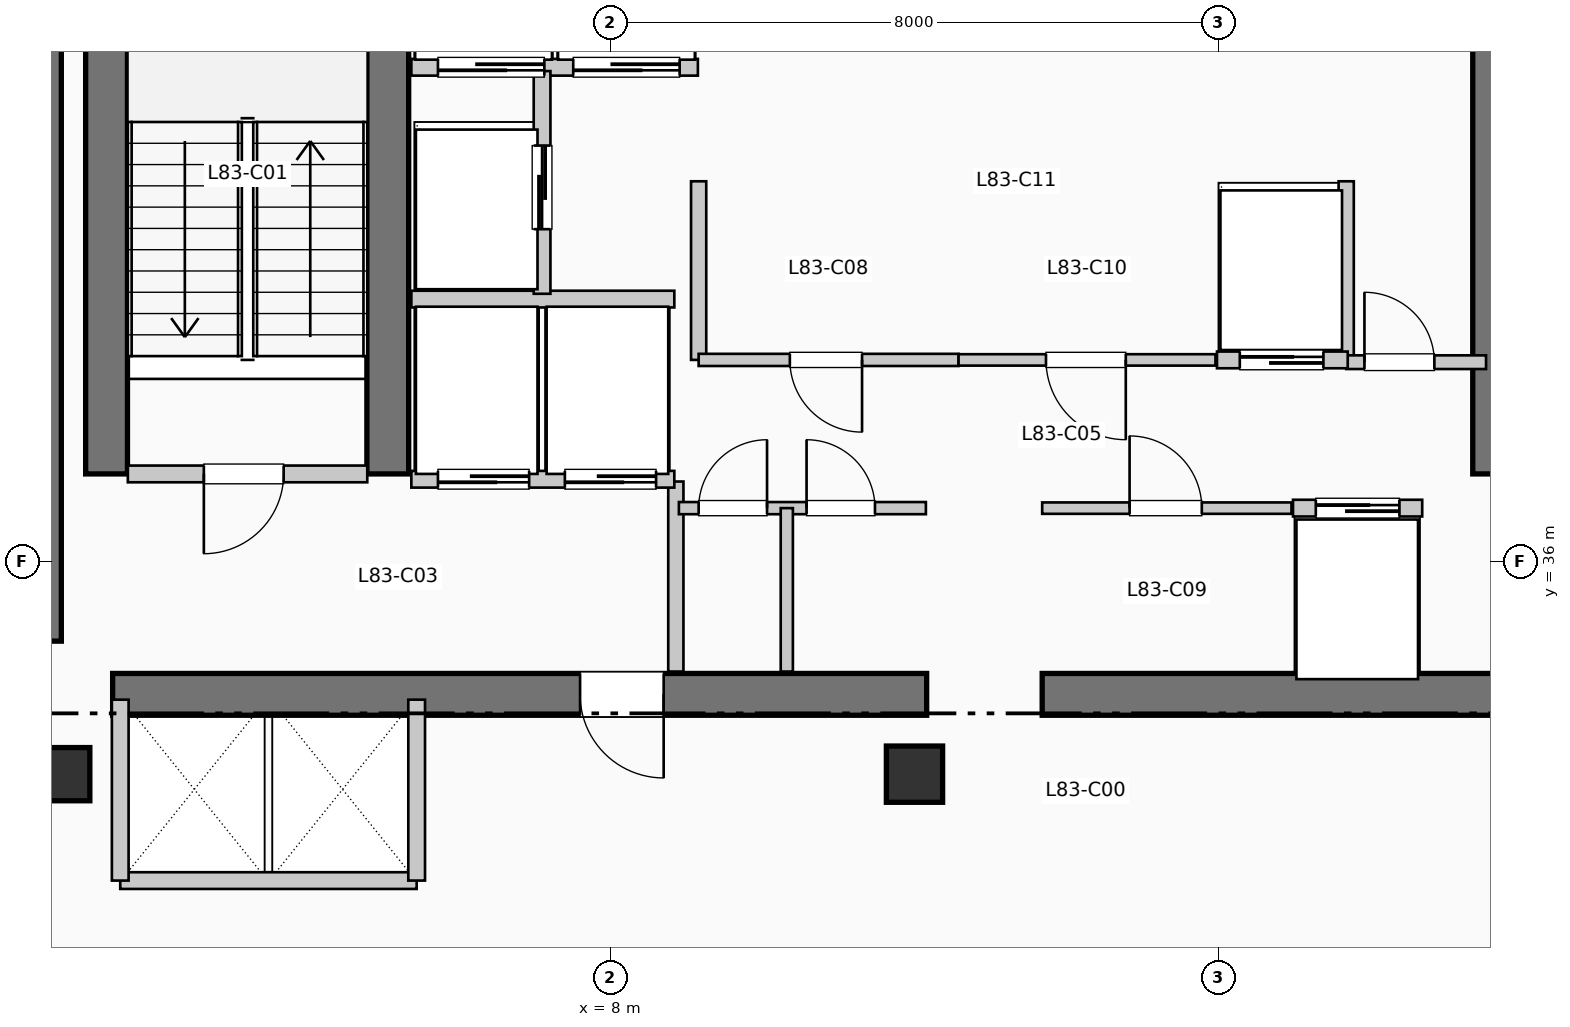
"""IFC4 building model, lengths in metres.
Left out: names, types, materials, properties, quantities, classifications, styles, units other than length and angle.
Written with IfcOpenShell. Run it as: python <this file> out.ifc"""

import sys

from ifc_helpers import new_model, si_unit, direction, frame, frame_2d, origin, origin_2d, place, context, subcontext, project, spatial, rectangle, extrude, element, fill, save


model = new_model("IFC4")
c1 = context("Model", 3, precision=1e-05, world=origin(), true_north=direction((0.0, 1.0)))
c2 = subcontext(c1, "Body", "Model", "MODEL_VIEW")
j1 = project(units=[si_unit("LENGTHUNIT", "METRE"), si_unit("PLANEANGLEUNIT", "RADIAN")], contexts=[c1])
p1 = place(None, origin())
s1 = spatial("IfcSite", under=j1, at=p1, CompositionType="ELEMENT")
p2 = place(p1, origin())
s2 = spatial("IfcBuilding", under=s1, at=p2, CompositionType="ELEMENT")
p3 = place(p2, frame((0.0, 0.0, 339.57)))
s3 = spatial("IfcBuildingStorey", under=s2, at=p3, CompositionType="ELEMENT", Elevation=339.57)
p4 = place(p3, frame((0.5, 34.95, 0.0), z_axis=(0.0, 0.0, 1.0), x_axis=(0.0, 1.0, 0.0)))
e1 = element("IfcWall", 1, at=p4, inside=s3, PredefinedType="SHEAR", context=c2, shape_type="SweptSolid", body=[
    extrude(rectangle(XDim=7.9, YDim=0.55, at=frame_2d((3.95, 0.0))), origin(), (0.0, 0.0, 1.0), 3.96),
])
p5 = place(p3, frame((1.45, 34.25, 0.0), z_axis=(0.0, 0.0, 1.0), x_axis=(1.0, 0.0, 0.0)))
e2 = element("IfcWall", 2, at=p5, inside=s3, PredefinedType="SHEAR", context=c2, shape_type="SweptSolid", body=[
    extrude(rectangle(XDim=10.71, YDim=0.55, at=frame_2d((5.355, 0.0))), origin(), (0.0, 0.0, 1.0), 3.96),
])
p6 = place(p5, frame((7.25, 0.0, 0.0), z_axis=(0.0, 0.0, 1.0), x_axis=(-1.0, 0.0, 0.0)))
e3 = element("IfcOpeningElement", 3, at=p6, cuts=e2, PredefinedType="OPENING", context=c2, shape_type="SweptSolid", body=[
    extrude(rectangle(XDim=1.1, YDim=2.15, at=frame_2d((0.55, 1.075))), frame((0.0, 0.285, 0.0), z_axis=(0.0, -1.0, 0.0), x_axis=(1.0, 0.0, 0.0)), (0.0, 0.0, 1.0), 0.57),
])
p7 = place(p3, frame((13.68, 34.25, 0.0), z_axis=(0.0, 0.0, 1.0), x_axis=(1.0, 0.0, 0.0)))
e4 = element("IfcWall", 4, at=p7, inside=s3, PredefinedType="SHEAR", context=c2, shape_type="SweptSolid", body=[
    extrude(rectangle(XDim=6.12, YDim=0.55, at=frame_2d((3.06, 0.0))), origin(), (0.0, 0.0, 1.0), 3.96),
])
for number, where, z_axis, x_axis in (
    (5, (1.37, 37.15, 0.0), (0.0, 0.0, 1.0), (0.0, 1.0, 0.0)),
    (6, (5.07, 37.15, 0.0), (0.0, 0.0, 1.0), (0.0, 1.0, 0.0)),
    (7, (19.62, 37.15, 0.0), (0.0, 0.0, 1.0), (0.0, 1.0, 0.0)),
):
    element("IfcWall", number, at=place(p3, frame(where, z_axis=z_axis, x_axis=x_axis)), inside=s3, PredefinedType="SHEAR", context=c2, shape_type="SweptSolid", body=[
        extrude(rectangle(XDim=7.89, YDim=0.55, at=frame_2d((3.945, 0.0))), origin(), (0.0, 0.0, 1.0), 3.96),
    ])
p8 = place(p3, frame((0.8, 33.2, 0.0), z_axis=(0.0, 0.0, 1.0), x_axis=(1.0, 0.0, 0.0)))
e8 = element("IfcColumn", 8, at=p8, inside=s3, PredefinedType="COLUMN", context=c2, shape_type="SweptSolid", body=[
    extrude(rectangle(XDim=0.7, YDim=0.7, at=origin_2d()), origin(), (0.0, 0.0, 1.0), 3.96),
])
p9 = place(p3, frame((12.0, 33.2, 0.0), z_axis=(0.0, 0.0, 1.0), x_axis=(1.0, 0.0, 0.0)))
e9 = element("IfcColumn", 9, at=p9, inside=s3, PredefinedType="COLUMN", context=c2, shape_type="SweptSolid", body=[
    extrude(rectangle(XDim=0.74, YDim=0.74, at=origin_2d()), origin(), (0.0, 0.0, 1.0), 3.96),
])
p10 = place(p3, frame((1.65, 37.15, 0.0), z_axis=(0.0, 0.0, 1.0), x_axis=(1.0, 0.0, 0.0)))
e10 = element("IfcWall", 10, at=p10, inside=s3, PredefinedType="PARTITIONING", context=c2, shape_type="SweptSolid", body=[
    extrude(rectangle(XDim=3.15, YDim=0.22, at=frame_2d((1.575, 0.0))), origin(), (0.0, 0.0, 1.0), 3.74),
])
p11 = place(p10, frame((2.05, 0.0, 0.0), z_axis=(0.0, 0.0, 1.0), x_axis=(-1.0, 0.0, 0.0)))
e11 = element("IfcOpeningElement", 11, at=p11, cuts=e10, PredefinedType="OPENING", context=c2, shape_type="SweptSolid", body=[
    extrude(rectangle(XDim=1.05, YDim=2.15, at=frame_2d((0.525, 1.075))), frame((0.0, 0.12, 0.0), z_axis=(0.0, -1.0, 0.0), x_axis=(1.0, 0.0, 0.0)), (0.0, 0.0, 1.0), 0.24),
])
p12 = place(p3, frame((8.86, 34.55, 0.0), z_axis=(0.0, 0.0, 1.0), x_axis=(0.0, 1.0, 0.0)))
e12 = element("IfcWall", 12, at=p12, inside=s3, PredefinedType="PARTITIONING", context=c2, shape_type="SweptSolid", body=[
    extrude(rectangle(XDim=2.5, YDim=0.2, at=frame_2d((1.25, 0.0))), origin(), (0.0, 0.0, 1.0), 3.74),
])
p13 = place(p3, frame((5.38, 37.08, 0.0), z_axis=(0.0, 0.0, 1.0), x_axis=(1.0, 0.0, 0.0)))
e13 = element("IfcWall", 13, at=p13, inside=s3, PredefinedType="PARTITIONING", context=c2, shape_type="SweptSolid", body=[
    extrude(rectangle(XDim=3.46, YDim=0.22, at=frame_2d((1.73, 0.0))), origin(), (0.0, 0.0, 1.0), 3.74),
])
p14 = place(p13, frame((1.55, 0.0, 0.0), z_axis=(0.0, 0.0, 1.0), x_axis=(-1.0, 0.0, 0.0)))
e14 = element("IfcOpeningElement", 14, at=p14, cuts=e13, PredefinedType="OPENING", context=c2, shape_type="SweptSolid", body=[
    extrude(rectangle(XDim=1.2, YDim=2.2, at=frame_2d((0.6, 1.1))), frame((0.0, 0.12, 0.0), z_axis=(0.0, -1.0, 0.0), x_axis=(1.0, 0.0, 0.0)), (0.0, 0.0, 1.0), 0.24),
])
p15 = place(p13, frame((3.22, 0.0, 0.0), z_axis=(0.0, 0.0, 1.0), x_axis=(-1.0, 0.0, 0.0)))
e15 = element("IfcOpeningElement", 15, at=p15, cuts=e13, PredefinedType="OPENING", context=c2, shape_type="SweptSolid", body=[
    extrude(rectangle(XDim=1.2, YDim=2.2, at=frame_2d((0.6, 1.1))), frame((0.0, 0.12, 0.0), z_axis=(0.0, -1.0, 0.0), x_axis=(1.0, 0.0, 0.0)), (0.0, 0.0, 1.0), 0.24),
])
p16 = place(p3, frame((5.38, 39.45, 0.0), z_axis=(0.0, 0.0, 1.0), x_axis=(1.0, 0.0, 0.0)))
e16 = element("IfcWall", 16, at=p16, inside=s3, PredefinedType="PARTITIONING", context=c2, shape_type="SweptSolid", body=[
    extrude(rectangle(XDim=3.46, YDim=0.22, at=frame_2d((1.73, 0.0))), origin(), (0.0, 0.0, 1.0), 3.74),
])
p17 = place(p3, frame((5.38, 42.5, 0.0), z_axis=(0.0, 0.0, 1.0), x_axis=(1.0, 0.0, 0.0)))
e17 = element("IfcWall", 17, at=p17, inside=s3, PredefinedType="PARTITIONING", context=c2, shape_type="SweptSolid", body=[
    extrude(rectangle(XDim=3.77, YDim=0.22, at=frame_2d((1.885, 0.0))), origin(), (0.0, 0.0, 1.0), 3.74),
])
p18 = place(p17, frame((1.75, 0.0, 0.0), z_axis=(0.0, 0.0, 1.0), x_axis=(-1.0, 0.0, 0.0)))
e18 = element("IfcOpeningElement", 18, at=p18, cuts=e17, PredefinedType="OPENING", context=c2, shape_type="SweptSolid", body=[
    extrude(rectangle(XDim=1.4, YDim=2.2, at=frame_2d((0.7, 1.1))), frame((0.0, 0.12, 0.0), z_axis=(0.0, -1.0, 0.0), x_axis=(1.0, 0.0, 0.0)), (0.0, 0.0, 1.0), 0.24),
])
p19 = place(p17, frame((3.53, 0.0, 0.0), z_axis=(0.0, 0.0, 1.0), x_axis=(-1.0, 0.0, 0.0)))
e19 = element("IfcOpeningElement", 19, at=p19, cuts=e17, PredefinedType="OPENING", context=c2, shape_type="SweptSolid", body=[
    extrude(rectangle(XDim=1.4, YDim=2.2, at=frame_2d((0.7, 1.1))), frame((0.0, 0.12, 0.0), z_axis=(0.0, -1.0, 0.0), x_axis=(1.0, 0.0, 0.0)), (0.0, 0.0, 1.0), 0.24),
])
p20 = place(p3, frame((7.1, 39.52, 0.0), z_axis=(0.0, 0.0, 1.0), x_axis=(0.0, 1.0, 0.0)))
e20 = element("IfcWall", 20, at=p20, inside=s3, PredefinedType="PARTITIONING", context=c2, shape_type="SweptSolid", body=[
    extrude(rectangle(XDim=2.93, YDim=0.22, at=frame_2d((1.465, 0.0))), origin(), (0.0, 0.0, 1.0), 3.74),
])
p21 = place(p20, frame((0.85, 0.0, 0.0)))
e21 = element("IfcOpeningElement", 21, at=p21, cuts=e20, PredefinedType="OPENING", context=c2, shape_type="SweptSolid", body=[
    extrude(rectangle(XDim=1.1, YDim=2.2, at=frame_2d((0.55, 1.1))), frame((0.0, 0.12, 0.0), z_axis=(0.0, -1.0, 0.0), x_axis=(1.0, 0.0, 0.0)), (0.0, 0.0, 1.0), 0.24),
])
p22 = place(p3, frame((1.55, 31.8, 0.0), z_axis=(0.0, 0.0, 1.0), x_axis=(1.0, 0.0, 0.0)))
e22 = element("IfcWall", 22, at=p22, inside=s3, PredefinedType="PARTITIONING", context=c2, shape_type="SweptSolid", body=[
    extrude(rectangle(XDim=3.9, YDim=0.22, at=frame_2d((1.95, 0.0))), origin(), (0.0, 0.0, 1.0), 3.74),
])
for number, where, z_axis, x_axis in (
    (23, (1.55, 31.8, 0.0), (0.0, 0.0, 1.0), (0.0, 1.0, 0.0)),
    (24, (5.45, 31.8, 0.0), (0.0, 0.0, 1.0), (0.0, 1.0, 0.0)),
):
    element("IfcWall", number, at=place(p3, frame(where, z_axis=z_axis, x_axis=x_axis)), inside=s3, PredefinedType="PARTITIONING", context=c2, shape_type="SweptSolid", body=[
        extrude(rectangle(XDim=2.38, YDim=0.22, at=frame_2d((1.19, 0.0))), origin(), (0.0, 0.0, 1.0), 3.74),
    ])
for number, where, z_axis, x_axis in (
    (25, (9.16, 38.65, 0.0), (0.0, 0.0, 1.0), (0.0, 1.0, 0.0)),
    (26, (17.68, 38.65, 0.0), (0.0, 0.0, 1.0), (0.0, 1.0, 0.0)),
):
    element("IfcWall", number, at=place(p3, frame(where, z_axis=z_axis, x_axis=x_axis)), inside=s3, PredefinedType="PARTITIONING", context=c2, shape_type="SweptSolid", body=[
        extrude(rectangle(XDim=2.35, YDim=0.2, at=frame_2d((1.175, 0.0))), origin(), (0.0, 0.0, 1.0), 3.74),
    ])
p23 = place(p3, frame((17.68, 38.62, 0.0), z_axis=(0.0, 0.0, 1.0), x_axis=(1.0, 0.0, 0.0)))
e27 = element("IfcWall", 27, at=p23, inside=s3, PredefinedType="PARTITIONING", context=c2, shape_type="SweptSolid", body=[
    extrude(rectangle(XDim=1.84, YDim=0.18, at=frame_2d((0.92, 0.0))), origin(), (0.0, 0.0, 1.0), 3.74),
])
p24 = place(p23, frame((0.24, 0.0, 0.0)))
e28 = element("IfcOpeningElement", 28, at=p24, cuts=e27, PredefinedType="OPENING", context=c2, shape_type="SweptSolid", body=[
    extrude(rectangle(XDim=0.92, YDim=2.1, at=frame_2d((0.46, 1.05))), frame((0.0, 0.1, 0.0), z_axis=(0.0, -1.0, 0.0), x_axis=(1.0, 0.0, 0.0)), (0.0, 0.0, 1.0), 0.2),
])
p25 = place(p3, frame((8.9, 36.7, 0.0), z_axis=(0.0, 0.0, 1.0), x_axis=(1.0, 0.0, 0.0)))
e29 = element("IfcWall", 29, at=p25, inside=s3, PredefinedType="PARTITIONING", context=c2, shape_type="SweptSolid", body=[
    extrude(rectangle(XDim=3.25, YDim=0.16, at=frame_2d((1.625, 0.0))), origin(), (0.0, 0.0, 1.0), 3.74),
])
p26 = place(p25, frame((0.26, 0.0, 0.0)))
e30 = element("IfcOpeningElement", 30, at=p26, cuts=e29, PredefinedType="OPENING", context=c2, shape_type="SweptSolid", body=[
    extrude(rectangle(XDim=0.9, YDim=2.15, at=frame_2d((0.45, 1.075))), frame((0.0, 0.09, 0.0), z_axis=(0.0, -1.0, 0.0), x_axis=(1.0, 0.0, 0.0)), (0.0, 0.0, 1.0), 0.18),
])
p27 = place(p25, frame((1.68, 0.0, 0.0)))
e31 = element("IfcOpeningElement", 31, at=p27, cuts=e29, PredefinedType="OPENING", context=c2, shape_type="SweptSolid", body=[
    extrude(rectangle(XDim=0.9, YDim=2.15, at=frame_2d((0.45, 1.075))), frame((0.0, 0.09, 0.0), z_axis=(0.0, -1.0, 0.0), x_axis=(1.0, 0.0, 0.0)), (0.0, 0.0, 1.0), 0.18),
])
p28 = place(p3, frame((10.32, 34.55, 0.0), z_axis=(0.0, 0.0, 1.0), x_axis=(0.0, 1.0, 0.0)))
e32 = element("IfcWall", 32, at=p28, inside=s3, PredefinedType="PARTITIONING", context=c2, shape_type="SweptSolid", body=[
    extrude(rectangle(XDim=2.15, YDim=0.16, at=frame_2d((1.075, 0.0))), origin(), (0.0, 0.0, 1.0), 3.74),
])
p29 = place(p3, frame((9.16, 38.65, 0.0), z_axis=(0.0, 0.0, 1.0), x_axis=(1.0, 0.0, 0.0)))
e33 = element("IfcWall", 33, at=p29, inside=s3, PredefinedType="PARTITIONING", context=c2, shape_type="SweptSolid", body=[
    extrude(rectangle(XDim=3.42, YDim=0.16, at=frame_2d((1.71, 0.0))), origin(), (0.0, 0.0, 1.0), 3.74),
])
p30 = place(p29, frame((2.15, 0.0, 0.0), z_axis=(0.0, 0.0, 1.0), x_axis=(-1.0, 0.0, 0.0)))
e34 = element("IfcOpeningElement", 34, at=p30, cuts=e33, PredefinedType="OPENING", context=c2, shape_type="SweptSolid", body=[
    extrude(rectangle(XDim=0.95, YDim=2.15, at=frame_2d((0.475, 1.075))), frame((0.0, 0.09, 0.0), z_axis=(0.0, -1.0, 0.0), x_axis=(1.0, 0.0, 0.0)), (0.0, 0.0, 1.0), 0.18),
])
p31 = place(p3, frame((13.68, 36.7, 0.0), z_axis=(0.0, 0.0, 1.0), x_axis=(1.0, 0.0, 0.0)))
e35 = element("IfcWall", 35, at=p31, inside=s3, PredefinedType="PARTITIONING", context=c2, shape_type="SweptSolid", body=[
    extrude(rectangle(XDim=3.28, YDim=0.15, at=frame_2d((1.64, 0.0))), origin(), (0.0, 0.0, 1.0), 3.74),
])
p32 = place(p31, frame((1.15, 0.0, 0.0)))
e36 = element("IfcOpeningElement", 36, at=p32, cuts=e35, PredefinedType="OPENING", context=c2, shape_type="SweptSolid", body=[
    extrude(rectangle(XDim=0.95, YDim=2.15, at=frame_2d((0.475, 1.075))), frame((0.0, 0.085, 0.0), z_axis=(0.0, -1.0, 0.0), x_axis=(1.0, 0.0, 0.0)), (0.0, 0.0, 1.0), 0.17),
])
p33 = place(p3, frame((12.58, 38.65, 0.0), z_axis=(0.0, 0.0, 1.0), x_axis=(1.0, 0.0, 0.0)))
e37 = element("IfcWall", 37, at=p33, inside=s3, PredefinedType="PARTITIONING", context=c2, shape_type="SweptSolid", body=[
    extrude(rectangle(XDim=3.38, YDim=0.15, at=frame_2d((1.69, 0.0))), origin(), (0.0, 0.0, 1.0), 3.74),
])
p34 = place(p33, frame((2.2, 0.0, 0.0), z_axis=(0.0, 0.0, 1.0), x_axis=(-1.0, 0.0, 0.0)))
e38 = element("IfcOpeningElement", 38, at=p34, cuts=e37, PredefinedType="OPENING", context=c2, shape_type="SweptSolid", body=[
    extrude(rectangle(XDim=1.05, YDim=2.15, at=frame_2d((0.525, 1.075))), frame((0.0, 0.085, 0.0), z_axis=(0.0, -1.0, 0.0), x_axis=(1.0, 0.0, 0.0)), (0.0, 0.0, 1.0), 0.17),
])
p35 = place(p3, frame((16.98, 36.7, 0.0), z_axis=(0.0, 0.0, 1.0), x_axis=(1.0, 0.0, 0.0)))
e39 = element("IfcWall", 39, at=p35, inside=s3, PredefinedType="PARTITIONING", context=c2, shape_type="SweptSolid", body=[
    extrude(rectangle(XDim=1.7, YDim=0.22, at=frame_2d((0.85, 0.0))), origin(), (0.0, 0.0, 1.0), 3.74),
])
p36 = place(p35, frame((0.3, 0.0, 0.0)))
e40 = element("IfcOpeningElement", 40, at=p36, cuts=e39, PredefinedType="OPENING", context=c2, shape_type="SweptSolid", body=[
    extrude(rectangle(XDim=1.1, YDim=2.2, at=frame_2d((0.55, 1.1))), frame((0.0, 0.12, 0.0), z_axis=(0.0, -1.0, 0.0), x_axis=(1.0, 0.0, 0.0)), (0.0, 0.0, 1.0), 0.24),
])
p37 = place(p3, frame((15.98, 38.65, 0.0), z_axis=(0.0, 0.0, 1.0), x_axis=(1.0, 0.0, 0.0)))
e41 = element("IfcWall", 41, at=p37, inside=s3, PredefinedType="PARTITIONING", context=c2, shape_type="SweptSolid", body=[
    extrude(rectangle(XDim=1.72, YDim=0.22, at=frame_2d((0.86, 0.0))), origin(), (0.0, 0.0, 1.0), 3.74),
])
p38 = place(p37, frame((0.3, 0.0, 0.0)))
e42 = element("IfcOpeningElement", 42, at=p38, cuts=e41, PredefinedType="OPENING", context=c2, shape_type="SweptSolid", body=[
    extrude(rectangle(XDim=1.1, YDim=2.2, at=frame_2d((0.55, 1.1))), frame((0.0, 0.12, 0.0), z_axis=(0.0, -1.0, 0.0), x_axis=(1.0, 0.0, 0.0)), (0.0, 0.0, 1.0), 0.24),
])
p39 = place(p11, origin())
e43 = element("IfcDoor", 43, at=p39, inside=s3, OperationType="SINGLE_SWING_LEFT", PredefinedType="DOOR", context=c2, shape_type="SweptSolid", body=[
    extrude(rectangle(XDim=1.05, YDim=2.15, at=frame_2d((0.525, 1.075))), frame((0.0, 0.025, 0.0), z_axis=(0.0, -1.0, 0.0), x_axis=(1.0, 0.0, 0.0)), (0.0, 0.0, 1.0), 0.05),
])
fill(e11, e43)
p40 = place(p6, origin())
e44 = element("IfcDoor", 44, at=p40, inside=s3, OperationType="SINGLE_SWING_RIGHT", PredefinedType="DOOR", context=c2, shape_type="SweptSolid", body=[
    extrude(rectangle(XDim=1.1, YDim=2.15, at=frame_2d((0.55, 1.075))), frame((0.0, 0.025, 0.0), z_axis=(0.0, -1.0, 0.0), x_axis=(1.0, 0.0, 0.0)), (0.0, 0.0, 1.0), 0.05),
])
fill(e3, e44)
p41 = place(p14, origin())
e45 = element("IfcDoor", 45, at=p41, inside=s3, OperationType="SLIDING_TO_RIGHT", PredefinedType="DOOR", context=c2, shape_type="SweptSolid", body=[
    extrude(rectangle(XDim=1.2, YDim=2.2, at=frame_2d((0.6, 1.1))), frame((0.0, 0.025, 0.0), z_axis=(0.0, -1.0, 0.0), x_axis=(1.0, 0.0, 0.0)), (0.0, 0.0, 1.0), 0.05),
])
fill(e14, e45)
p42 = place(p15, origin())
e46 = element("IfcDoor", 46, at=p42, inside=s3, OperationType="SLIDING_TO_RIGHT", PredefinedType="DOOR", context=c2, shape_type="SweptSolid", body=[
    extrude(rectangle(XDim=1.2, YDim=2.2, at=frame_2d((0.6, 1.1))), frame((0.0, 0.025, 0.0), z_axis=(0.0, -1.0, 0.0), x_axis=(1.0, 0.0, 0.0)), (0.0, 0.0, 1.0), 0.05),
])
fill(e15, e46)
p43 = place(p18, origin())
e47 = element("IfcDoor", 47, at=p43, inside=s3, OperationType="SLIDING_TO_LEFT", PredefinedType="DOOR", context=c2, shape_type="SweptSolid", body=[
    extrude(rectangle(XDim=1.4, YDim=2.2, at=frame_2d((0.7, 1.1))), frame((0.0, 0.025, 0.0), z_axis=(0.0, -1.0, 0.0), x_axis=(1.0, 0.0, 0.0)), (0.0, 0.0, 1.0), 0.05),
])
fill(e18, e47)
p44 = place(p19, origin())
e48 = element("IfcDoor", 48, at=p44, inside=s3, OperationType="SLIDING_TO_LEFT", PredefinedType="DOOR", context=c2, shape_type="SweptSolid", body=[
    extrude(rectangle(XDim=1.4, YDim=2.2, at=frame_2d((0.7, 1.1))), frame((0.0, 0.025, 0.0), z_axis=(0.0, -1.0, 0.0), x_axis=(1.0, 0.0, 0.0)), (0.0, 0.0, 1.0), 0.05),
])
fill(e19, e48)
p45 = place(p21, origin())
e49 = element("IfcDoor", 49, at=p45, inside=s3, OperationType="SLIDING_TO_LEFT", PredefinedType="DOOR", context=c2, shape_type="SweptSolid", body=[
    extrude(rectangle(XDim=1.1, YDim=2.2, at=frame_2d((0.55, 1.1))), frame((0.0, 0.025, 0.0), z_axis=(0.0, -1.0, 0.0), x_axis=(1.0, 0.0, 0.0)), (0.0, 0.0, 1.0), 0.05),
])
fill(e21, e49)
p46 = place(p24, origin())
e50 = element("IfcDoor", 50, at=p46, inside=s3, OperationType="SINGLE_SWING_LEFT", PredefinedType="DOOR", context=c2, shape_type="SweptSolid", body=[
    extrude(rectangle(XDim=0.92, YDim=2.1, at=frame_2d((0.46, 1.05))), frame((0.0, 0.025, 0.0), z_axis=(0.0, -1.0, 0.0), x_axis=(1.0, 0.0, 0.0)), (0.0, 0.0, 1.0), 0.05),
])
fill(e28, e50)
p47 = place(p26, origin())
e51 = element("IfcDoor", 51, at=p47, inside=s3, OperationType="SINGLE_SWING_RIGHT", PredefinedType="DOOR", context=c2, shape_type="SweptSolid", body=[
    extrude(rectangle(XDim=0.9, YDim=2.15, at=frame_2d((0.45, 1.075))), frame((0.0, 0.025, 0.0), z_axis=(0.0, -1.0, 0.0), x_axis=(1.0, 0.0, 0.0)), (0.0, 0.0, 1.0), 0.05),
])
fill(e30, e51)
p48 = place(p27, origin())
e52 = element("IfcDoor", 52, at=p48, inside=s3, OperationType="SINGLE_SWING_LEFT", PredefinedType="DOOR", context=c2, shape_type="SweptSolid", body=[
    extrude(rectangle(XDim=0.9, YDim=2.15, at=frame_2d((0.45, 1.075))), frame((0.0, 0.025, 0.0), z_axis=(0.0, -1.0, 0.0), x_axis=(1.0, 0.0, 0.0)), (0.0, 0.0, 1.0), 0.05),
])
fill(e31, e52)
p49 = place(p30, origin())
e53 = element("IfcDoor", 53, at=p49, inside=s3, OperationType="SINGLE_SWING_RIGHT", PredefinedType="DOOR", context=c2, shape_type="SweptSolid", body=[
    extrude(rectangle(XDim=0.95, YDim=2.15, at=frame_2d((0.475, 1.075))), frame((0.0, 0.025, 0.0), z_axis=(0.0, -1.0, 0.0), x_axis=(1.0, 0.0, 0.0)), (0.0, 0.0, 1.0), 0.05),
])
fill(e34, e53)
p50 = place(p32, origin())
e54 = element("IfcDoor", 54, at=p50, inside=s3, OperationType="SINGLE_SWING_LEFT", PredefinedType="DOOR", context=c2, shape_type="SweptSolid", body=[
    extrude(rectangle(XDim=0.95, YDim=2.15, at=frame_2d((0.475, 1.075))), frame((0.0, 0.025, 0.0), z_axis=(0.0, -1.0, 0.0), x_axis=(1.0, 0.0, 0.0)), (0.0, 0.0, 1.0), 0.05),
])
fill(e36, e54)
p51 = place(p34, origin())
e55 = element("IfcDoor", 55, at=p51, inside=s3, OperationType="SINGLE_SWING_RIGHT", PredefinedType="DOOR", context=c2, shape_type="SweptSolid", body=[
    extrude(rectangle(XDim=1.05, YDim=2.15, at=frame_2d((0.525, 1.075))), frame((0.0, 0.025, 0.0), z_axis=(0.0, -1.0, 0.0), x_axis=(1.0, 0.0, 0.0)), (0.0, 0.0, 1.0), 0.05),
])
fill(e38, e55)
p52 = place(p36, origin())
e56 = element("IfcDoor", 56, at=p52, inside=s3, OperationType="SLIDING_TO_LEFT", PredefinedType="DOOR", context=c2, shape_type="SweptSolid", body=[
    extrude(rectangle(XDim=1.1, YDim=2.2, at=frame_2d((0.55, 1.1))), frame((0.0, 0.025, 0.0), z_axis=(0.0, -1.0, 0.0), x_axis=(1.0, 0.0, 0.0)), (0.0, 0.0, 1.0), 0.05),
])
fill(e40, e56)
p53 = place(p38, origin())
e57 = element("IfcDoor", 57, at=p53, inside=s3, OperationType="SLIDING_TO_LEFT", PredefinedType="DOOR", context=c2, shape_type="SweptSolid", body=[
    extrude(rectangle(XDim=1.1, YDim=2.2, at=frame_2d((0.55, 1.1))), frame((0.0, 0.025, 0.0), z_axis=(0.0, -1.0, 0.0), x_axis=(1.0, 0.0, 0.0)), (0.0, 0.0, 1.0), 0.05),
])
fill(e42, e57)
save(model, sys.argv[1])
